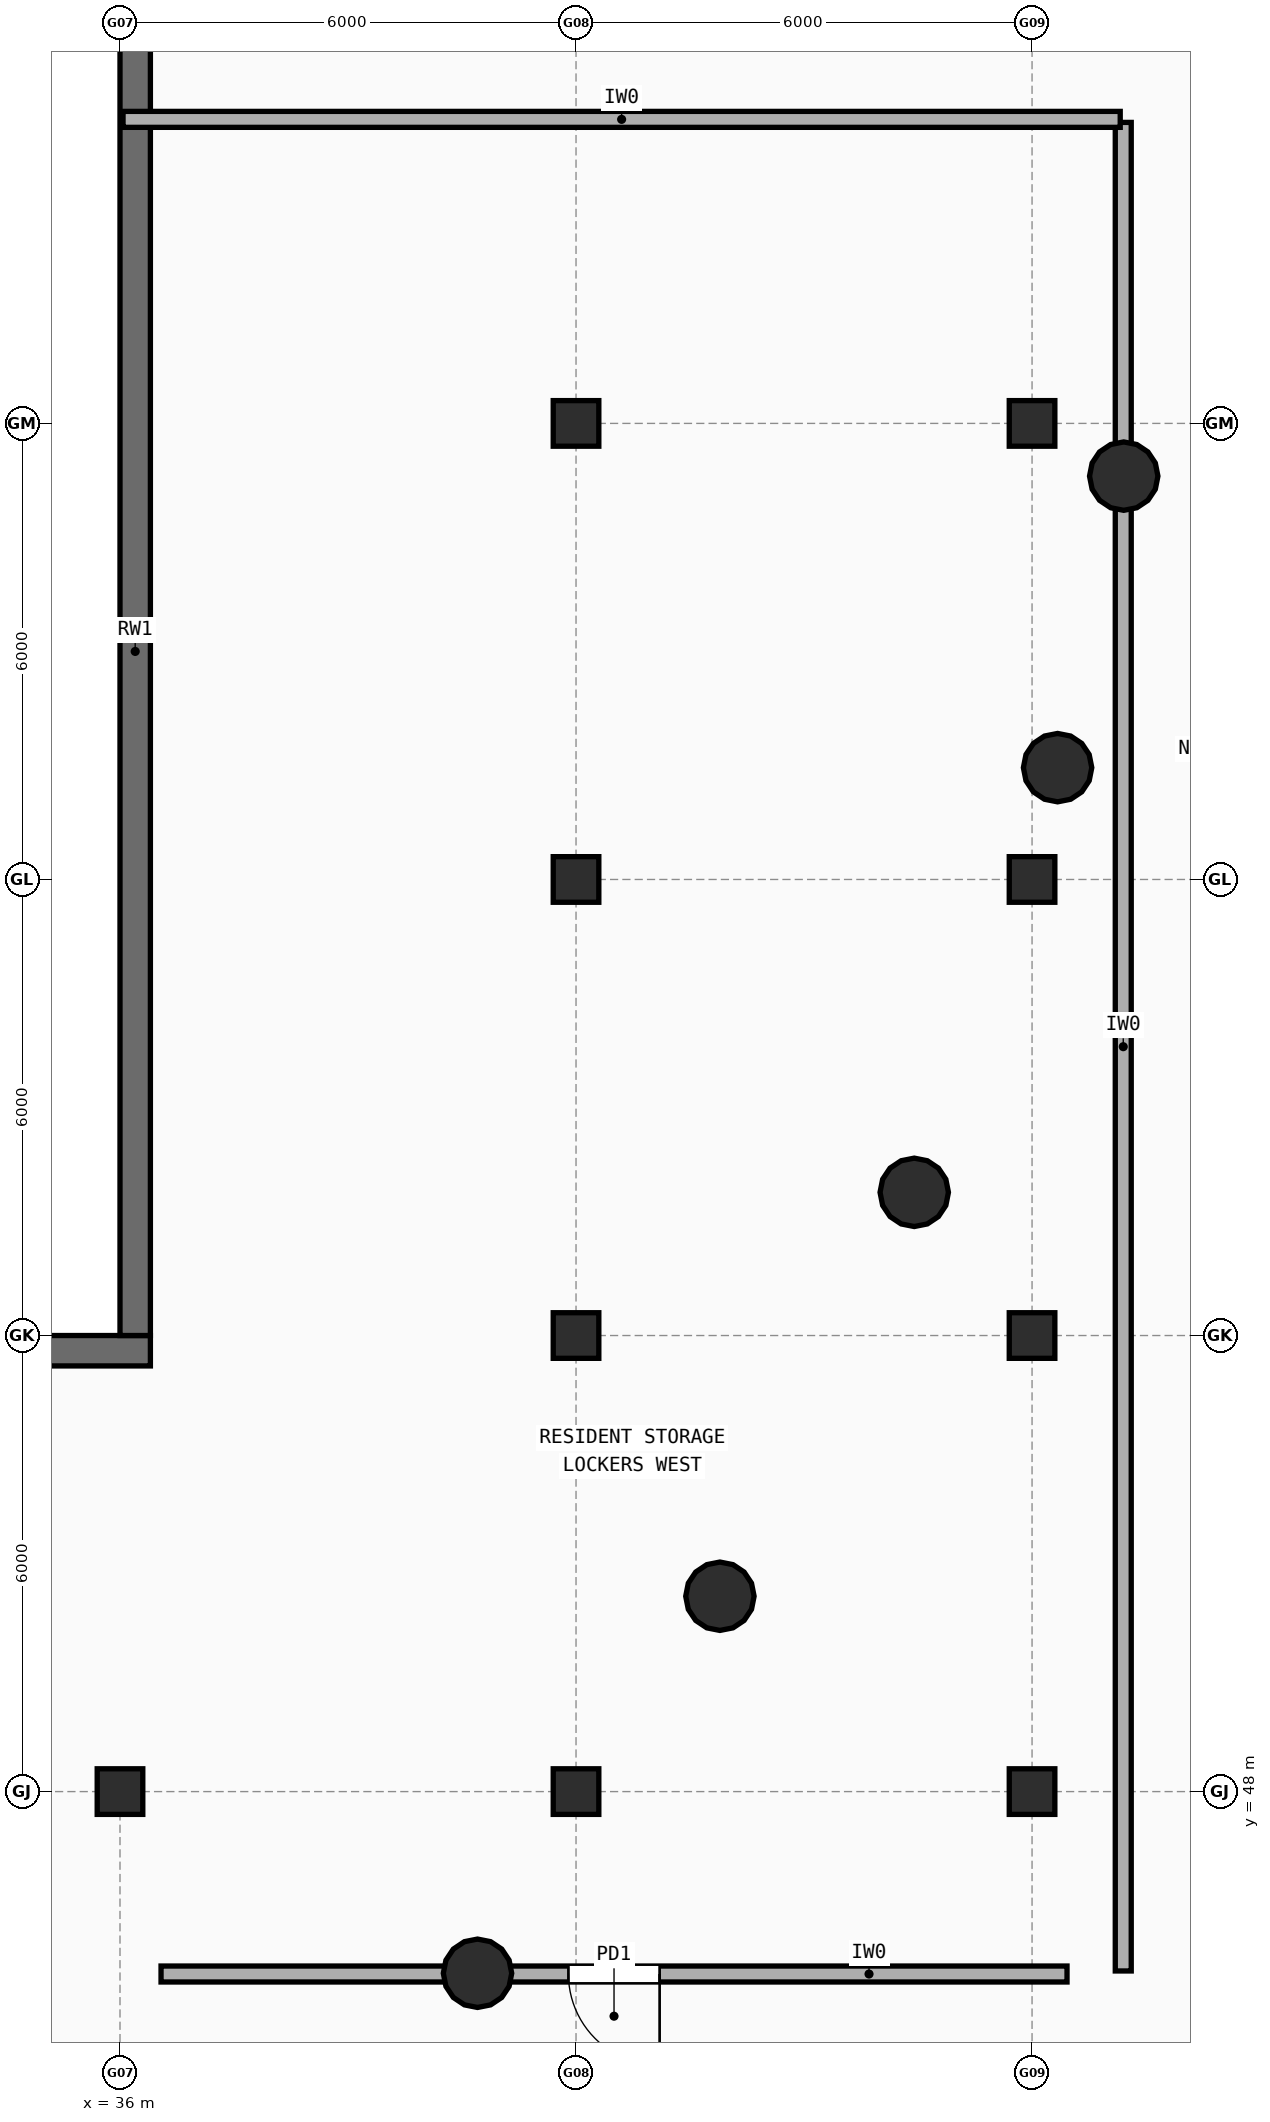
"""IFC4 building model, lengths in metres.
Left out: names, types, materials, properties, quantities, classifications, styles, units other than length and angle.
Written with IfcOpenShell. Run it as: python <this file> out.ifc"""

import sys

from ifc_helpers import new_model, si_unit, direction, frame, frame_2d, origin, origin_2d, place, context, subcontext, project, spatial, rectangle, circle, extrude, element, fill, save


model = new_model("IFC4")
c1 = context("Model", 3, precision=1e-05, world=origin(), true_north=direction((0.0, 1.0)))
c2 = subcontext(c1, "Body", "Model", "MODEL_VIEW")
j1 = project(units=[si_unit("LENGTHUNIT", "METRE"), si_unit("PLANEANGLEUNIT", "RADIAN")], contexts=[c1])
p1 = place(None, origin())
s1 = spatial("IfcSite", under=j1, at=p1, CompositionType="ELEMENT")
p2 = place(p1, origin())
s2 = spatial("IfcBuilding", under=s1, at=p2, CompositionType="ELEMENT")
p3 = place(p2, frame((0.0, 0.0, -4.5)))
s3 = spatial("IfcBuildingStorey", under=s2, at=p3, CompositionType="ELEMENT", Elevation=-4.5)
p4 = place(p3, frame((17.6, 53.8, 0.0), z_axis=(0.0, 0.0, 1.0), x_axis=(1.0, 0.0, 0.0)))
e1 = element("IfcWall", 1, at=p4, inside=s3, PredefinedType="USERDEFINED", context=c2, shape_type="SweptSolid", body=[
    extrude(rectangle(XDim=18.8, YDim=0.4, at=frame_2d((9.4, 0.0))), origin(), (0.0, 0.0, 1.0), 4.215),
])
p5 = place(p3, frame((36.2, 72.0, 0.0), z_axis=(0.0, 0.0, 1.0), x_axis=(0.0, -1.0, 0.0)))
e2 = element("IfcWall", 2, at=p5, inside=s3, PredefinedType="USERDEFINED", context=c2, shape_type="SweptSolid", body=[
    extrude(rectangle(XDim=18.0, YDim=0.4, at=frame_2d((9.0, 0.0))), origin(), (0.0, 0.0, 1.0), 4.215),
])
for number, where, z_axis, x_axis in (
    (3, (36.0, 48.0, 0.0), (0.0, 0.0, 1.0), (1.0, 0.0, 0.0)),
    (4, (42.0, 48.0, 0.0), (0.0, 0.0, 1.0), (1.0, 0.0, 0.0)),
    (5, (42.0, 54.0, 0.0), (0.0, 0.0, 1.0), (1.0, 0.0, 0.0)),
    (6, (42.0, 60.0, 0.0), (0.0, 0.0, 1.0), (1.0, 0.0, 0.0)),
    (7, (42.0, 66.0, 0.0), (0.0, 0.0, 1.0), (1.0, 0.0, 0.0)),
    (8, (48.0, 48.0, 0.0), (0.0, 0.0, 1.0), (1.0, 0.0, 0.0)),
    (9, (48.0, 54.0, 0.0), (0.0, 0.0, 1.0), (1.0, 0.0, 0.0)),
    (10, (48.0, 60.0, 0.0), (0.0, 0.0, 1.0), (1.0, 0.0, 0.0)),
    (11, (48.0, 66.0, 0.0), (0.0, 0.0, 1.0), (1.0, 0.0, 0.0)),
):
    element("IfcColumn", number, at=place(p3, frame(where, z_axis=z_axis, x_axis=x_axis)), inside=s3, PredefinedType="COLUMN", context=c2, shape_type="SweptSolid", body=[
        extrude(rectangle(XDim=0.6, YDim=0.6, at=origin_2d()), origin(), (0.0, 0.0, 1.0), 4.302),
    ])
for number, where, z_axis, x_axis in (
    (12, (40.704, 45.61, 0.0), (0.0, 0.0, 1.0), (1.0, 0.0, 0.0)),
    (13, (43.893, 50.57, 0.0), (0.0, 0.0, 1.0), (1.0, 0.0, 0.0)),
    (14, (46.45, 55.884, 0.0), (0.0, 0.0, 1.0), (1.0, 0.0, 0.0)),
    (15, (48.336, 61.471, 0.0), (0.0, 0.0, 1.0), (1.0, 0.0, 0.0)),
    (16, (49.206, 65.306, 0.0), (0.0, 0.0, 1.0), (1.0, 0.0, 0.0)),
):
    element("IfcColumn", number, at=place(p3, frame(where, z_axis=z_axis, x_axis=x_axis)), inside=s3, PredefinedType="COLUMN", context=c2, shape_type="SweptSolid", body=[
        extrude(circle(Radius=0.45, at=origin_2d()), origin(), (0.0, 0.0, 1.0), 4.302),
    ])
p6 = place(p3, frame((36.54, 45.6, 0.0), z_axis=(0.0, 0.0, 1.0), x_axis=(1.0, 0.0, 0.0)))
e17 = element("IfcWall", 17, at=p6, inside=s3, PredefinedType="SOLIDWALL", context=c2, shape_type="SweptSolid", body=[
    extrude(rectangle(XDim=11.92, YDim=0.21, at=frame_2d((5.96, 0.0))), origin(), (0.0, 0.0, 1.0), 3.497),
])
p7 = place(p6, frame((5.36, 0.0, 0.0)))
e18 = element("IfcOpeningElement", 18, at=p7, cuts=e17, PredefinedType="OPENING", context=c2, shape_type="SweptSolid", body=[
    extrude(rectangle(XDim=1.2, YDim=2.15, at=frame_2d((0.6, 1.075))), frame((0.0, 0.115, 0.0), z_axis=(0.0, -1.0, 0.0), x_axis=(1.0, 0.0, 0.0)), (0.0, 0.0, 1.0), 0.23),
])
p8 = place(p3, frame((49.2, 45.64, 0.0), z_axis=(0.0, 0.0, 1.0), x_axis=(0.0, 1.0, 0.0)))
e19 = element("IfcWall", 19, at=p8, inside=s3, PredefinedType="SOLIDWALL", context=c2, shape_type="SweptSolid", body=[
    extrude(rectangle(XDim=24.32, YDim=0.21, at=frame_2d((12.16, 0.0))), origin(), (0.0, 0.0, 1.0), 3.447),
])
p9 = place(p3, frame((49.16, 70.0, 0.0), z_axis=(0.0, 0.0, 1.0), x_axis=(-1.0, 0.0, 0.0)))
e20 = element("IfcWall", 20, at=p9, inside=s3, PredefinedType="SOLIDWALL", context=c2, shape_type="SweptSolid", body=[
    extrude(rectangle(XDim=13.12, YDim=0.21, at=frame_2d((6.56, 0.0))), origin(), (0.0, 0.0, 1.0), 3.497),
])
p10 = place(p7, origin())
e21 = element("IfcDoor", 21, at=p10, inside=s3, OperationType="SINGLE_SWING_RIGHT", PredefinedType="DOOR", context=c2, shape_type="SweptSolid", body=[
    extrude(rectangle(XDim=1.2, YDim=2.15, at=frame_2d((0.6, 1.075))), frame((0.0, 0.025, 0.0), z_axis=(0.0, -1.0, 0.0), x_axis=(1.0, 0.0, 0.0)), (0.0, 0.0, 1.0), 0.05),
])
fill(e18, e21)
save(model, sys.argv[1])
